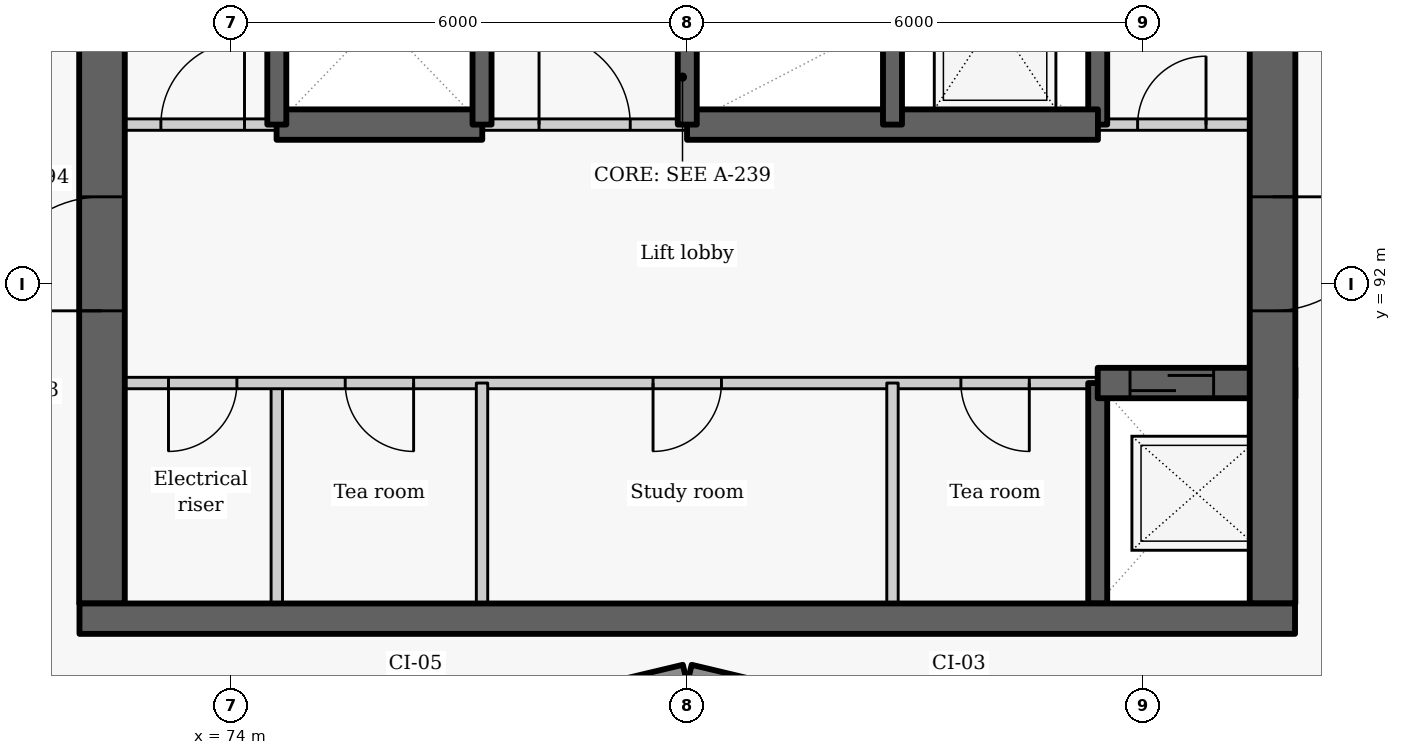
"""IFC4 building model, lengths in metres.
Left out: names, types, materials, properties, quantities, classifications, styles, units other than length and angle.
Written with IfcOpenShell. Run it as: python <this file> out.ifc"""

import sys

from ifc_helpers import new_model, si_unit, direction, frame, frame_2d, origin, place, context, subcontext, project, spatial, rectangle, extrude, element, fill, save


model = new_model("IFC4")
c1 = context("Model", 3, precision=1e-05, world=origin(), true_north=direction((0.0, 1.0)))
c2 = subcontext(c1, "Body", "Model", "MODEL_VIEW")
j1 = project(units=[si_unit("LENGTHUNIT", "METRE"), si_unit("PLANEANGLEUNIT", "RADIAN")], contexts=[c1])
p1 = place(None, origin())
s1 = spatial("IfcSite", under=j1, at=p1, CompositionType="ELEMENT")
p2 = place(p1, origin())
s2 = spatial("IfcBuilding", under=s1, at=p2, CompositionType="ELEMENT")
p3 = place(p2, frame((0.0, 0.0, 226.2)))
s3 = spatial("IfcBuildingStorey", under=s2, at=p3, CompositionType="ELEMENT", Elevation=226.2)
for number, where, z_axis, x_axis in (
    (1, (76.814, 86.119, 0.0), (0.0, 0.0, 1.0), (0.973, 0.232, 0.0)),
    (2, (80.029, 86.872, 0.0), (0.0, 0.0, 1.0), (0.973, -0.232, 0.0)),
):
    element("IfcWall", number, at=place(p3, frame(where, z_axis=z_axis, x_axis=x_axis)), inside=s3, PredefinedType="SOLIDWALL", context=c2, shape_type="SweptSolid", body=[
        extrude(rectangle(XDim=3.246, YDim=0.25, at=frame_2d((1.623, 0.0))), origin(), (0.0, 0.0, 1.0), 2.425),
    ])
p4 = place(p3, frame((74.6, 87.8, 0.0), z_axis=(0.0, 0.0, 1.0), x_axis=(0.0, 1.0, 0.0)))
e3 = element("IfcWall", 3, at=p4, inside=s3, PredefinedType="PARTITIONING", context=c2, shape_type="SweptSolid", body=[
    extrude(rectangle(XDim=2.9, YDim=0.15, at=frame_2d((1.45, 0.0))), origin(), (0.0, 0.0, 1.0), 3.025),
])
p5 = place(p3, frame((85.4, 90.7, 0.0), z_axis=(0.0, 0.0, 1.0), x_axis=(-1.0, 0.0, 0.0)))
e4 = element("IfcWall", 4, at=p5, inside=s3, PredefinedType="PARTITIONING", context=c2, shape_type="SweptSolid", body=[
    extrude(rectangle(XDim=13.4, YDim=0.15, at=frame_2d((6.7, 0.0))), origin(), (0.0, 0.0, 1.0), 3.025),
])
p6 = place(p5, frame((11.325, 0.0, 0.0)))
e5 = element("IfcOpeningElement", 5, at=p6, cuts=e4, PredefinedType="OPENING", context=c2, shape_type="SweptSolid", body=[
    extrude(rectangle(XDim=0.9, YDim=2.1, at=frame_2d((0.45, 1.05))), frame((0.0, 0.085, 0.0), z_axis=(0.0, -1.0, 0.0), x_axis=(1.0, 0.0, 0.0)), (0.0, 0.0, 1.0), 0.17),
])
p7 = place(p5, frame((9.0, 0.0, 0.0)))
e6 = element("IfcOpeningElement", 6, at=p7, cuts=e4, PredefinedType="OPENING", context=c2, shape_type="SweptSolid", body=[
    extrude(rectangle(XDim=0.9, YDim=2.1, at=frame_2d((0.45, 1.05))), frame((0.0, 0.085, 0.0), z_axis=(0.0, -1.0, 0.0), x_axis=(1.0, 0.0, 0.0)), (0.0, 0.0, 1.0), 0.17),
])
p8 = place(p5, frame((4.95, 0.0, 0.0)))
e7 = element("IfcOpeningElement", 7, at=p8, cuts=e4, PredefinedType="OPENING", context=c2, shape_type="SweptSolid", body=[
    extrude(rectangle(XDim=0.9, YDim=2.1, at=frame_2d((0.45, 1.05))), frame((0.0, 0.085, 0.0), z_axis=(0.0, -1.0, 0.0), x_axis=(1.0, 0.0, 0.0)), (0.0, 0.0, 1.0), 0.17),
])
p9 = place(p5, frame((0.9, 0.0, 0.0)))
e8 = element("IfcOpeningElement", 8, at=p9, cuts=e4, PredefinedType="OPENING", context=c2, shape_type="SweptSolid", body=[
    extrude(rectangle(XDim=0.9, YDim=2.1, at=frame_2d((0.45, 1.05))), frame((0.0, 0.085, 0.0), z_axis=(0.0, -1.0, 0.0), x_axis=(1.0, 0.0, 0.0)), (0.0, 0.0, 1.0), 0.17),
])
p10 = place(p3, frame((72.3, 87.8, -0.41), z_axis=(0.0, 0.0, 1.0), x_axis=(0.0, 1.0, 0.0)))
e9 = element("IfcWall", 9, at=p10, inside=s3, PredefinedType="SHEAR", context=c2, shape_type="SweptSolid", body=[
    extrude(rectangle(XDim=9.1, YDim=0.6, at=frame_2d((4.55, 0.0))), origin(), (0.0, 0.0, 1.0), 3.435),
])
p11 = place(p10, frame((3.85, 0.0, 0.41)))
e10 = element("IfcOpeningElement", 10, at=p11, cuts=e9, PredefinedType="OPENING", context=c2, shape_type="SweptSolid", body=[
    extrude(rectangle(XDim=1.5, YDim=2.1, at=frame_2d((0.75, 1.05))), frame((0.0, 0.31, 0.0), z_axis=(0.0, -1.0, 0.0), x_axis=(1.0, 0.0, 0.0)), (0.0, 0.0, 1.0), 0.62),
])
p12 = place(p3, frame((85.4, 87.8, -0.41), z_axis=(0.0, 0.0, 1.0), x_axis=(0.0, 1.0, 0.0)))
e11 = element("IfcWall", 11, at=p12, inside=s3, PredefinedType="SHEAR", context=c2, shape_type="SweptSolid", body=[
    extrude(rectangle(XDim=2.9, YDim=0.25, at=frame_2d((1.45, 0.0))), origin(), (0.0, 0.0, 1.0), 3.435),
])
p13 = place(p3, frame((85.4, 94.1, -0.41), z_axis=(0.0, 0.0, 1.0), x_axis=(0.0, 1.0, 0.0)))
e12 = element("IfcWall", 12, at=p13, inside=s3, PredefinedType="SHEAR", context=c2, shape_type="SweptSolid", body=[
    extrude(rectangle(XDim=2.8, YDim=0.25, at=frame_2d((1.4, 0.0))), origin(), (0.0, 0.0, 1.0), 3.435),
])
p14 = place(p3, frame((85.4, 90.7, -0.41), z_axis=(0.0, 0.0, 1.0), x_axis=(1.0, 0.0, 0.0)))
e13 = element("IfcWall", 13, at=p14, inside=s3, PredefinedType="SHEAR", context=c2, shape_type="SweptSolid", body=[
    extrude(rectangle(XDim=2.6, YDim=0.4, at=frame_2d((1.3, 0.0))), origin(), (0.0, 0.0, 1.0), 3.435),
])
p15 = place(p14, frame((0.425, 0.0, 0.41)))
e14 = element("IfcOpeningElement", 14, at=p15, cuts=e13, PredefinedType="OPENING", context=c2, shape_type="SweptSolid", body=[
    extrude(rectangle(XDim=1.1, YDim=2.1, at=frame_2d((0.55, 1.05))), frame((0.0, 0.21, 0.0), z_axis=(0.0, -1.0, 0.0), x_axis=(1.0, 0.0, 0.0)), (0.0, 0.0, 1.0), 0.42),
])
p16 = place(p3, frame((87.7, 102.05, -0.41), z_axis=(0.0, 0.0, 1.0), x_axis=(0.0, -1.0, 0.0)))
e15 = element("IfcWall", 15, at=p16, inside=s3, PredefinedType="SHEAR", context=c2, shape_type="SweptSolid", body=[
    extrude(rectangle(XDim=14.25, YDim=0.6, at=frame_2d((7.125, 0.0))), origin(), (0.0, 0.0, 1.0), 3.435),
])
p17 = place(p16, frame((8.9, 0.0, 0.41)))
e16 = element("IfcOpeningElement", 16, at=p17, cuts=e15, PredefinedType="OPENING", context=c2, shape_type="SweptSolid", body=[
    extrude(rectangle(XDim=1.5, YDim=2.1, at=frame_2d((0.75, 1.05))), frame((0.0, 0.31, 0.0), z_axis=(0.0, -1.0, 0.0), x_axis=(1.0, 0.0, 0.0)), (0.0, 0.0, 1.0), 0.62),
])
p18 = place(p16, frame((2.025, 0.0, 0.41)))
e17 = element("IfcOpeningElement", 17, at=p18, cuts=e15, PredefinedType="OPENING", context=c2, shape_type="SweptSolid", body=[
    extrude(rectangle(XDim=1.1, YDim=2.1, at=frame_2d((0.55, 1.05))), frame((0.0, 0.31, 0.0), z_axis=(0.0, -1.0, 0.0), x_axis=(1.0, 0.0, 0.0)), (0.0, 0.0, 1.0), 0.62),
])
for number, where, z_axis, x_axis in (
    (18, (77.3, 87.8, 0.0), (0.0, 0.0, 1.0), (0.0, 1.0, 0.0)),
    (19, (82.7, 87.8, 0.0), (0.0, 0.0, 1.0), (0.0, 1.0, 0.0)),
):
    element("IfcWall", number, at=place(p3, frame(where, z_axis=z_axis, x_axis=x_axis)), inside=s3, PredefinedType="PARTITIONING", context=c2, shape_type="SweptSolid", body=[
        extrude(rectangle(XDim=2.9, YDim=0.15, at=frame_2d((1.45, 0.0))), origin(), (0.0, 0.0, 1.0), 3.025),
    ])
p19 = place(p3, frame((72.0, 94.1, 0.0), z_axis=(0.0, 0.0, 1.0), x_axis=(1.0, 0.0, 0.0)))
e20 = element("IfcWall", 20, at=p19, inside=s3, PredefinedType="PARTITIONING", context=c2, shape_type="SweptSolid", body=[
    extrude(rectangle(XDim=2.603, YDim=0.15, at=frame_2d((1.302, 0.0))), origin(), (0.0, 0.0, 1.0), 3.025),
])
p20 = place(p19, frame((1.075, 0.0, 0.0)))
e21 = element("IfcOpeningElement", 21, at=p20, cuts=e20, PredefinedType="OPENING", context=c2, shape_type="SweptSolid", body=[
    extrude(rectangle(XDim=1.1, YDim=2.1, at=frame_2d((0.55, 1.05))), frame((0.0, 0.085, 0.0), z_axis=(0.0, -1.0, 0.0), x_axis=(1.0, 0.0, 0.0)), (0.0, 0.0, 1.0), 0.17),
])
p21 = place(p3, frame((77.297, 94.1, 0.0), z_axis=(0.0, 0.0, 1.0), x_axis=(1.0, 0.0, 0.0)))
e22 = element("IfcWall", 22, at=p21, inside=s3, PredefinedType="PARTITIONING", context=c2, shape_type="SweptSolid", body=[
    extrude(rectangle(XDim=2.706, YDim=0.15, at=frame_2d((1.353, 0.0))), origin(), (0.0, 0.0, 1.0), 3.025),
])
p22 = place(p21, frame((0.753, 0.0, 0.0)))
e23 = element("IfcOpeningElement", 23, at=p22, cuts=e22, PredefinedType="OPENING", context=c2, shape_type="SweptSolid", body=[
    extrude(rectangle(XDim=1.2, YDim=2.1, at=frame_2d((0.6, 1.05))), frame((0.0, 0.085, 0.0), z_axis=(0.0, -1.0, 0.0), x_axis=(1.0, 0.0, 0.0)), (0.0, 0.0, 1.0), 0.17),
])
p23 = place(p3, frame((85.397, 94.1, 0.0), z_axis=(0.0, 0.0, 1.0), x_axis=(1.0, 0.0, 0.0)))
e24 = element("IfcWall", 24, at=p23, inside=s3, PredefinedType="PARTITIONING", context=c2, shape_type="SweptSolid", body=[
    extrude(rectangle(XDim=2.603, YDim=0.15, at=frame_2d((1.302, 0.0))), origin(), (0.0, 0.0, 1.0), 3.025),
])
p24 = place(p23, frame((0.528, 0.0, 0.0)))
e25 = element("IfcOpeningElement", 25, at=p24, cuts=e24, PredefinedType="OPENING", context=c2, shape_type="SweptSolid", body=[
    extrude(rectangle(XDim=0.9, YDim=2.1, at=frame_2d((0.45, 1.05))), frame((0.0, 0.085, 0.0), z_axis=(0.0, -1.0, 0.0), x_axis=(1.0, 0.0, 0.0)), (0.0, 0.0, 1.0), 0.17),
])
p25 = place(p3, frame((74.597, 94.1, -0.41), z_axis=(0.0, 0.0, 1.0), x_axis=(1.0, 0.0, 0.0)))
e26 = element("IfcWall", 26, at=p25, inside=s3, PredefinedType="SHEAR", context=c2, shape_type="SweptSolid", body=[
    extrude(rectangle(XDim=2.706, YDim=0.4, at=frame_2d((1.353, 0.0))), origin(), (0.0, 0.0, 1.0), 3.435),
])
p26 = place(p3, frame((79.997, 94.1, -0.41), z_axis=(0.0, 0.0, 1.0), x_axis=(1.0, 0.0, 0.0)))
e27 = element("IfcWall", 27, at=p26, inside=s3, PredefinedType="SHEAR", context=c2, shape_type="SweptSolid", body=[
    extrude(rectangle(XDim=5.406, YDim=0.4, at=frame_2d((2.703, 0.0))), origin(), (0.0, 0.0, 1.0), 3.435),
])
for number, where, z_axis, x_axis in (
    (28, (74.6, 94.1, -0.41), (0.0, 0.0, 1.0), (0.0, 1.0, 0.0)),
    (29, (77.3, 94.1, -0.41), (0.0, 0.0, 1.0), (0.0, 1.0, 0.0)),
    (30, (80.0, 94.1, -0.41), (0.0, 0.0, 1.0), (0.0, 1.0, 0.0)),
    (31, (82.7, 94.1, -0.41), (0.0, 0.0, 1.0), (0.0, 1.0, 0.0)),
):
    element("IfcWall", number, at=place(p3, frame(where, z_axis=z_axis, x_axis=x_axis)), inside=s3, PredefinedType="SHEAR", context=c2, shape_type="SweptSolid", body=[
        extrude(rectangle(XDim=2.8, YDim=0.25, at=frame_2d((1.4, 0.0))), origin(), (0.0, 0.0, 1.0), 3.435),
    ])
p27 = place(p3, frame((72.004, 87.6, -0.41), z_axis=(0.0, 0.0, 1.0), x_axis=(1.0, 0.0, 0.0)))
e32 = element("IfcWall", 32, at=p27, inside=s3, PredefinedType="SHEAR", context=c2, shape_type="SweptSolid", body=[
    extrude(rectangle(XDim=15.992, YDim=0.4, at=frame_2d((7.996, 0.0))), origin(), (0.0, 0.0, 1.0), 3.435),
])
p28 = place(p6, origin())
e33 = element("IfcDoor", 33, at=p28, inside=s3, OperationType="SINGLE_SWING_RIGHT", PredefinedType="DOOR", context=c2, shape_type="SweptSolid", body=[
    extrude(rectangle(XDim=0.9, YDim=2.1, at=frame_2d((0.45, 1.05))), frame((0.0, 0.025, 0.0), z_axis=(0.0, -1.0, 0.0), x_axis=(1.0, 0.0, 0.0)), (0.0, 0.0, 1.0), 0.05),
])
fill(e5, e33)
p29 = place(p15, origin())
e34 = element("IfcDoor", 34, at=p29, inside=s3, OperationType="SLIDING_TO_LEFT", PredefinedType="DOOR", context=c2, shape_type="SweptSolid", body=[
    extrude(rectangle(XDim=1.1, YDim=2.1, at=frame_2d((0.55, 1.05))), frame((0.0, 0.025, 0.0), z_axis=(0.0, -1.0, 0.0), x_axis=(1.0, 0.0, 0.0)), (0.0, 0.0, 1.0), 0.05),
])
fill(e14, e34)
p30 = place(p7, origin())
e35 = element("IfcDoor", 35, at=p30, inside=s3, OperationType="SINGLE_SWING_LEFT", PredefinedType="DOOR", context=c2, shape_type="SweptSolid", body=[
    extrude(rectangle(XDim=0.9, YDim=2.1, at=frame_2d((0.45, 1.05))), frame((0.0, 0.025, 0.0), z_axis=(0.0, -1.0, 0.0), x_axis=(1.0, 0.0, 0.0)), (0.0, 0.0, 1.0), 0.05),
])
fill(e6, e35)
p31 = place(p8, origin())
e36 = element("IfcDoor", 36, at=p31, inside=s3, OperationType="SINGLE_SWING_RIGHT", PredefinedType="DOOR", context=c2, shape_type="SweptSolid", body=[
    extrude(rectangle(XDim=0.9, YDim=2.1, at=frame_2d((0.45, 1.05))), frame((0.0, 0.025, 0.0), z_axis=(0.0, -1.0, 0.0), x_axis=(1.0, 0.0, 0.0)), (0.0, 0.0, 1.0), 0.05),
])
fill(e7, e36)
p32 = place(p9, origin())
e37 = element("IfcDoor", 37, at=p32, inside=s3, OperationType="SINGLE_SWING_LEFT", PredefinedType="DOOR", context=c2, shape_type="SweptSolid", body=[
    extrude(rectangle(XDim=0.9, YDim=2.1, at=frame_2d((0.45, 1.05))), frame((0.0, 0.025, 0.0), z_axis=(0.0, -1.0, 0.0), x_axis=(1.0, 0.0, 0.0)), (0.0, 0.0, 1.0), 0.05),
])
fill(e8, e37)
p33 = place(p20, origin())
e38 = element("IfcDoor", 38, at=p33, inside=s3, OperationType="SINGLE_SWING_RIGHT", PredefinedType="DOOR", context=c2, shape_type="SweptSolid", body=[
    extrude(rectangle(XDim=1.1, YDim=2.1, at=frame_2d((0.55, 1.05))), frame((0.0, 0.025, 0.0), z_axis=(0.0, -1.0, 0.0), x_axis=(1.0, 0.0, 0.0)), (0.0, 0.0, 1.0), 0.05),
])
fill(e21, e38)
p34 = place(p22, origin())
e39 = element("IfcDoor", 39, at=p34, inside=s3, OperationType="DOUBLE_DOOR_SINGLE_SWING", PredefinedType="DOOR", context=c2, shape_type="SweptSolid", body=[
    extrude(rectangle(XDim=1.2, YDim=2.1, at=frame_2d((0.6, 1.05))), frame((0.0, 0.025, 0.0), z_axis=(0.0, -1.0, 0.0), x_axis=(1.0, 0.0, 0.0)), (0.0, 0.0, 1.0), 0.05),
])
fill(e23, e39)
p35 = place(p24, origin())
e40 = element("IfcDoor", 40, at=p35, inside=s3, OperationType="SINGLE_SWING_RIGHT", PredefinedType="DOOR", context=c2, shape_type="SweptSolid", body=[
    extrude(rectangle(XDim=0.9, YDim=2.1, at=frame_2d((0.45, 1.05))), frame((0.0, 0.025, 0.0), z_axis=(0.0, -1.0, 0.0), x_axis=(1.0, 0.0, 0.0)), (0.0, 0.0, 1.0), 0.05),
])
fill(e25, e40)
p36 = place(p17, origin())
e41 = element("IfcDoor", 41, at=p36, inside=s3, OperationType="DOUBLE_DOOR_SINGLE_SWING", PredefinedType="DOOR", context=c2, shape_type="SweptSolid", body=[
    extrude(rectangle(XDim=1.5, YDim=2.1, at=frame_2d((0.75, 1.05))), frame((0.0, 0.025, 0.0), z_axis=(0.0, -1.0, 0.0), x_axis=(1.0, 0.0, 0.0)), (0.0, 0.0, 1.0), 0.05),
])
fill(e16, e41)
p37 = place(p11, origin())
e42 = element("IfcDoor", 42, at=p37, inside=s3, OperationType="DOUBLE_DOOR_SINGLE_SWING", PredefinedType="DOOR", context=c2, shape_type="SweptSolid", body=[
    extrude(rectangle(XDim=1.5, YDim=2.1, at=frame_2d((0.75, 1.05))), frame((0.0, 0.025, 0.0), z_axis=(0.0, -1.0, 0.0), x_axis=(1.0, 0.0, 0.0)), (0.0, 0.0, 1.0), 0.05),
])
fill(e10, e42)
save(model, sys.argv[1])
